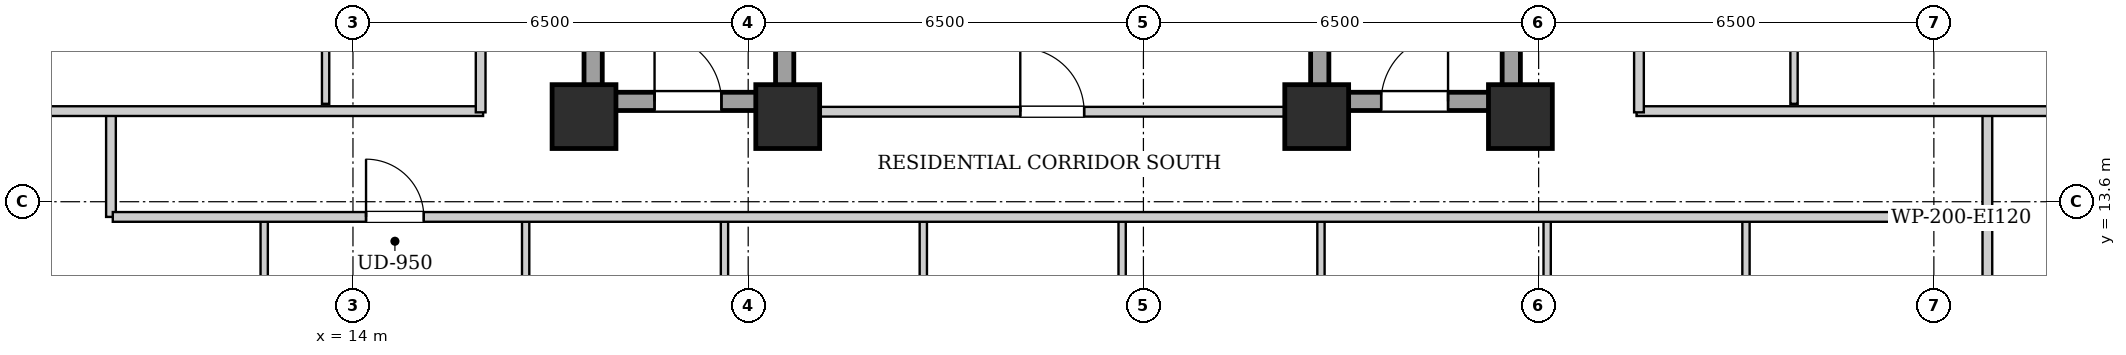
"""IFC4 building model, lengths in metres.
Left out: names, types, materials, properties, quantities, classifications, styles, units other than length and angle.
Written with IfcOpenShell. Run it as: python <this file> out.ifc"""

import sys

from ifc_helpers import new_model, si_unit, direction, frame, frame_2d, origin, origin_2d, place, context, subcontext, project, spatial, rectangle, extrude, element, fill, save


model = new_model("IFC4")
c1 = context("Model", 3, precision=1e-05, world=origin(), true_north=direction((0.0, 1.0)))
c2 = subcontext(c1, "Body", "Model", "MODEL_VIEW")
j1 = project(units=[si_unit("LENGTHUNIT", "METRE"), si_unit("PLANEANGLEUNIT", "RADIAN")], contexts=[c1])
p1 = place(None, origin())
s1 = spatial("IfcSite", under=j1, at=p1, CompositionType="ELEMENT")
p2 = place(p1, origin())
s2 = spatial("IfcBuilding", under=s1, at=p2, CompositionType="ELEMENT")
p3 = place(p2, frame((0.0, 0.0, 100.7)))
s3 = spatial("IfcBuildingStorey", under=s2, at=p3, CompositionType="ELEMENT", Elevation=100.7)
for number, where, z_axis, x_axis in (
    (1, (17.8, 15.0, 0.0), (0.0, 0.0, 1.0), (1.0, 0.0, 0.0)),
    (2, (21.15, 15.0, 0.0), (0.0, 0.0, 1.0), (1.0, 0.0, 0.0)),
    (3, (29.85, 15.0, 0.0), (0.0, 0.0, 1.0), (1.0, 0.0, 0.0)),
    (4, (33.2, 15.0, 0.0), (0.0, 0.0, 1.0), (1.0, 0.0, 0.0)),
):
    element("IfcColumn", number, at=place(p3, frame(where, z_axis=z_axis, x_axis=x_axis)), inside=s3, PredefinedType="COLUMN", context=c2, shape_type="SweptSolid", body=[
        extrude(rectangle(XDim=1.05, YDim=1.05, at=origin_2d()), origin(), (0.0, 0.0, 1.0), 3.2),
    ])
for number, where, z_axis, x_axis in (
    (5, (17.95, 15.1, 0.0), (0.0, 0.0, 1.0), (0.0, 1.0, 0.0)),
    (6, (21.1, 15.1, 0.0), (0.0, 0.0, 1.0), (0.0, 1.0, 0.0)),
):
    element("IfcWall", number, at=place(p3, frame(where, z_axis=z_axis, x_axis=x_axis)), inside=s3, PredefinedType="SHEAR", context=c2, shape_type="SweptSolid", body=[
        extrude(rectangle(XDim=9.0, YDim=0.3, at=frame_2d((4.5, 0.0))), origin(), (0.0, 0.0, 1.0), 2.94),
    ])
p4 = place(p3, frame((18.1, 15.25, 0.0), z_axis=(0.0, 0.0, 1.0), x_axis=(1.0, 0.0, 0.0)))
e7 = element("IfcWall", 7, at=p4, inside=s3, PredefinedType="SHEAR", context=c2, shape_type="SweptSolid", body=[
    extrude(rectangle(XDim=2.85, YDim=0.3, at=frame_2d((1.425, 0.0))), origin(), (0.0, 0.0, 1.0), 2.94),
])
p5 = place(p4, frame((0.86, 0.0, 0.0)))
e8 = element("IfcOpeningElement", 8, at=p5, cuts=e7, PredefinedType="OPENING", context=c2, shape_type="SweptSolid", body=[
    extrude(rectangle(XDim=1.1, YDim=2.05, at=frame_2d((0.55, 1.025))), frame((0.0, 0.16, 0.0), z_axis=(0.0, -1.0, 0.0), x_axis=(1.0, 0.0, 0.0)), (0.0, 0.0, 1.0), 0.32),
])
for number, where, z_axis, x_axis in (
    (9, (29.9, 15.1, 0.0), (0.0, 0.0, 1.0), (0.0, 1.0, 0.0)),
    (10, (33.05, 15.1, 0.0), (0.0, 0.0, 1.0), (0.0, 1.0, 0.0)),
):
    element("IfcWall", number, at=place(p3, frame(where, z_axis=z_axis, x_axis=x_axis)), inside=s3, PredefinedType="SHEAR", context=c2, shape_type="SweptSolid", body=[
        extrude(rectangle(XDim=9.0, YDim=0.3, at=frame_2d((4.5, 0.0))), origin(), (0.0, 0.0, 1.0), 2.94),
    ])
p6 = place(p3, frame((30.05, 15.25, 0.0), z_axis=(0.0, 0.0, 1.0), x_axis=(1.0, 0.0, 0.0)))
e11 = element("IfcWall", 11, at=p6, inside=s3, PredefinedType="SHEAR", context=c2, shape_type="SweptSolid", body=[
    extrude(rectangle(XDim=2.85, YDim=0.3, at=frame_2d((1.425, 0.0))), origin(), (0.0, 0.0, 1.0), 2.94),
])
p7 = place(p6, frame((0.86, 0.0, 0.0)))
e12 = element("IfcOpeningElement", 12, at=p7, cuts=e11, PredefinedType="OPENING", context=c2, shape_type="SweptSolid", body=[
    extrude(rectangle(XDim=1.1, YDim=2.05, at=frame_2d((0.55, 1.025))), frame((0.0, 0.16, 0.0), z_axis=(0.0, -1.0, 0.0), x_axis=(1.0, 0.0, 0.0)), (0.0, 0.0, 1.0), 0.32),
])
p8 = place(p3, frame((21.25, 15.08, 0.0), z_axis=(0.0, 0.0, 1.0), x_axis=(1.0, 0.0, 0.0)))
e13 = element("IfcWall", 13, at=p8, inside=s3, PredefinedType="PARTITIONING", context=c2, shape_type="SweptSolid", body=[
    extrude(rectangle(XDim=8.5, YDim=0.16, at=frame_2d((4.25, 0.0))), origin(), (0.0, 0.0, 1.0), 2.313),
])
p9 = place(p8, frame((3.725, 0.0, 0.0)))
e14 = element("IfcOpeningElement", 14, at=p9, cuts=e13, PredefinedType="OPENING", context=c2, shape_type="SweptSolid", body=[
    extrude(rectangle(XDim=1.05, YDim=2.05, at=frame_2d((0.525, 1.025))), frame((0.0, 0.09, 0.0), z_axis=(0.0, -1.0, 0.0), x_axis=(1.0, 0.0, 0.0)), (0.0, 0.0, 1.0), 0.18),
])
for number, where, z_axis, x_axis in (
    (15, (10.02, 13.35, 0.0), (0.0, 0.0, 1.0), (0.0, 1.0, 0.0)),
    (16, (40.88, 13.35, 0.0), (0.0, 0.0, 1.0), (0.0, 1.0, 0.0)),
):
    element("IfcWall", number, at=place(p3, frame(where, z_axis=z_axis, x_axis=x_axis)), inside=s3, PredefinedType="PARTITIONING", context=c2, shape_type="SweptSolid", body=[
        extrude(rectangle(XDim=1.74, YDim=0.16, at=frame_2d((0.87, 0.0))), origin(), (0.0, 0.0, 1.0), 2.94),
    ])
p10 = place(p3, frame((7.78, 15.09, 0.0), z_axis=(0.0, 0.0, 1.0), x_axis=(1.0, 0.0, 0.0)))
e17 = element("IfcWall", 17, at=p10, inside=s3, PredefinedType="PARTITIONING", context=c2, shape_type="SweptSolid", body=[
    extrude(rectangle(XDim=8.36, YDim=0.16, at=frame_2d((4.18, 0.0))), origin(), (0.0, 0.0, 1.0), 2.313),
])
p11 = place(p3, frame((35.11, 15.09, 0.0), z_axis=(0.0, 0.0, 1.0), x_axis=(1.0, 0.0, 0.0)))
e18 = element("IfcWall", 18, at=p11, inside=s3, PredefinedType="PARTITIONING", context=c2, shape_type="SweptSolid", body=[
    extrude(rectangle(XDim=8.01, YDim=0.16, at=frame_2d((4.005, 0.0))), origin(), (0.0, 0.0, 1.0), 2.313),
])
p12 = place(p3, frame((40.88, 10.4, 0.0), z_axis=(0.0, 0.0, 1.0), x_axis=(0.0, 1.0, 0.0)))
e19 = element("IfcWall", 19, at=p12, inside=s3, PredefinedType="PARTITIONING", context=c2, shape_type="SweptSolid", body=[
    extrude(rectangle(XDim=2.91, YDim=0.16, at=frame_2d((1.455, 0.0))), origin(), (0.0, 0.0, 1.0), 2.94),
])
p13 = place(p3, frame((12.54, 10.46, 0.0), z_axis=(0.0, 0.0, 1.0), x_axis=(0.0, 1.0, 0.0)))
e20 = element("IfcWall", 20, at=p13, inside=s3, PredefinedType="PARTITIONING", context=c2, shape_type="SweptSolid", body=[
    extrude(rectangle(XDim=2.85, YDim=0.12, at=frame_2d((1.425, 0.0))), origin(), (0.0, 0.0, 1.0), 2.94),
])
p14 = place(p13, frame((0.995, 0.0, 0.0)))
e21 = element("IfcOpeningElement", 21, at=p14, cuts=e20, PredefinedType="OPENING", context=c2, shape_type="SweptSolid", body=[
    extrude(rectangle(XDim=0.86, YDim=2.05, at=frame_2d((0.43, 1.025))), frame((0.0, 0.07, 0.0), z_axis=(0.0, -1.0, 0.0), x_axis=(1.0, 0.0, 0.0)), (0.0, 0.0, 1.0), 0.14),
])
p15 = place(p3, frame((16.84, 10.46, 0.0), z_axis=(0.0, 0.0, 1.0), x_axis=(0.0, 1.0, 0.0)))
e22 = element("IfcWall", 22, at=p15, inside=s3, PredefinedType="PARTITIONING", context=c2, shape_type="SweptSolid", body=[
    extrude(rectangle(XDim=2.85, YDim=0.12, at=frame_2d((1.425, 0.0))), origin(), (0.0, 0.0, 1.0), 2.94),
])
p16 = place(p15, frame((0.975, 0.0, 0.0)))
e23 = element("IfcOpeningElement", 23, at=p16, cuts=e22, PredefinedType="OPENING", context=c2, shape_type="SweptSolid", body=[
    extrude(rectangle(XDim=0.9, YDim=2.05, at=frame_2d((0.45, 1.025))), frame((0.0, 0.07, 0.0), z_axis=(0.0, -1.0, 0.0), x_axis=(1.0, 0.0, 0.0)), (0.0, 0.0, 1.0), 0.14),
])
p17 = place(p3, frame((20.11, 10.46, 0.0), z_axis=(0.0, 0.0, 1.0), x_axis=(0.0, 1.0, 0.0)))
e24 = element("IfcWall", 24, at=p17, inside=s3, PredefinedType="PARTITIONING", context=c2, shape_type="SweptSolid", body=[
    extrude(rectangle(XDim=2.85, YDim=0.12, at=frame_2d((1.425, 0.0))), origin(), (0.0, 0.0, 1.0), 2.94),
])
p18 = place(p17, frame((0.975, 0.0, 0.0)))
e25 = element("IfcOpeningElement", 25, at=p18, cuts=e24, PredefinedType="OPENING", context=c2, shape_type="SweptSolid", body=[
    extrude(rectangle(XDim=0.9, YDim=2.05, at=frame_2d((0.45, 1.025))), frame((0.0, 0.07, 0.0), z_axis=(0.0, -1.0, 0.0), x_axis=(1.0, 0.0, 0.0)), (0.0, 0.0, 1.0), 0.14),
])
p19 = place(p3, frame((23.38, 10.46, 0.0), z_axis=(0.0, 0.0, 1.0), x_axis=(0.0, 1.0, 0.0)))
e26 = element("IfcWall", 26, at=p19, inside=s3, PredefinedType="PARTITIONING", context=c2, shape_type="SweptSolid", body=[
    extrude(rectangle(XDim=2.85, YDim=0.12, at=frame_2d((1.425, 0.0))), origin(), (0.0, 0.0, 1.0), 2.94),
])
p20 = place(p19, frame((0.975, 0.0, 0.0)))
e27 = element("IfcOpeningElement", 27, at=p20, cuts=e26, PredefinedType="OPENING", context=c2, shape_type="SweptSolid", body=[
    extrude(rectangle(XDim=0.9, YDim=2.05, at=frame_2d((0.45, 1.025))), frame((0.0, 0.07, 0.0), z_axis=(0.0, -1.0, 0.0), x_axis=(1.0, 0.0, 0.0)), (0.0, 0.0, 1.0), 0.14),
])
p21 = place(p3, frame((26.65, 10.46, 0.0), z_axis=(0.0, 0.0, 1.0), x_axis=(0.0, 1.0, 0.0)))
e28 = element("IfcWall", 28, at=p21, inside=s3, PredefinedType="PARTITIONING", context=c2, shape_type="SweptSolid", body=[
    extrude(rectangle(XDim=2.85, YDim=0.12, at=frame_2d((1.425, 0.0))), origin(), (0.0, 0.0, 1.0), 2.94),
])
p22 = place(p21, frame((0.975, 0.0, 0.0)))
e29 = element("IfcOpeningElement", 29, at=p22, cuts=e28, PredefinedType="OPENING", context=c2, shape_type="SweptSolid", body=[
    extrude(rectangle(XDim=0.9, YDim=2.05, at=frame_2d((0.45, 1.025))), frame((0.0, 0.07, 0.0), z_axis=(0.0, -1.0, 0.0), x_axis=(1.0, 0.0, 0.0)), (0.0, 0.0, 1.0), 0.14),
])
p23 = place(p3, frame((29.92, 10.46, 0.0), z_axis=(0.0, 0.0, 1.0), x_axis=(0.0, 1.0, 0.0)))
e30 = element("IfcWall", 30, at=p23, inside=s3, PredefinedType="PARTITIONING", context=c2, shape_type="SweptSolid", body=[
    extrude(rectangle(XDim=2.85, YDim=0.12, at=frame_2d((1.425, 0.0))), origin(), (0.0, 0.0, 1.0), 2.94),
])
p24 = place(p23, frame((0.975, 0.0, 0.0)))
e31 = element("IfcOpeningElement", 31, at=p24, cuts=e30, PredefinedType="OPENING", context=c2, shape_type="SweptSolid", body=[
    extrude(rectangle(XDim=0.9, YDim=2.05, at=frame_2d((0.45, 1.025))), frame((0.0, 0.07, 0.0), z_axis=(0.0, -1.0, 0.0), x_axis=(1.0, 0.0, 0.0)), (0.0, 0.0, 1.0), 0.14),
])
p25 = place(p3, frame((33.64, 10.46, 0.0), z_axis=(0.0, 0.0, 1.0), x_axis=(0.0, 1.0, 0.0)))
e32 = element("IfcWall", 32, at=p25, inside=s3, PredefinedType="PARTITIONING", context=c2, shape_type="SweptSolid", body=[
    extrude(rectangle(XDim=2.85, YDim=0.12, at=frame_2d((1.425, 0.0))), origin(), (0.0, 0.0, 1.0), 2.94),
])
p26 = place(p25, frame((0.975, 0.0, 0.0)))
e33 = element("IfcOpeningElement", 33, at=p26, cuts=e32, PredefinedType="OPENING", context=c2, shape_type="SweptSolid", body=[
    extrude(rectangle(XDim=0.9, YDim=2.05, at=frame_2d((0.45, 1.025))), frame((0.0, 0.07, 0.0), z_axis=(0.0, -1.0, 0.0), x_axis=(1.0, 0.0, 0.0)), (0.0, 0.0, 1.0), 0.14),
])
p27 = place(p3, frame((36.91, 10.46, 0.0), z_axis=(0.0, 0.0, 1.0), x_axis=(0.0, 1.0, 0.0)))
e34 = element("IfcWall", 34, at=p27, inside=s3, PredefinedType="PARTITIONING", context=c2, shape_type="SweptSolid", body=[
    extrude(rectangle(XDim=2.85, YDim=0.12, at=frame_2d((1.425, 0.0))), origin(), (0.0, 0.0, 1.0), 2.94),
])
p28 = place(p27, frame((0.975, 0.0, 0.0)))
e35 = element("IfcOpeningElement", 35, at=p28, cuts=e34, PredefinedType="OPENING", context=c2, shape_type="SweptSolid", body=[
    extrude(rectangle(XDim=0.9, YDim=2.05, at=frame_2d((0.45, 1.025))), frame((0.0, 0.07, 0.0), z_axis=(0.0, -1.0, 0.0), x_axis=(1.0, 0.0, 0.0)), (0.0, 0.0, 1.0), 0.14),
])
p29 = place(p3, frame((13.55, 15.21, 0.0), z_axis=(0.0, 0.0, 1.0), x_axis=(0.0, 1.0, 0.0)))
e36 = element("IfcWall", 36, at=p29, inside=s3, PredefinedType="PARTITIONING", context=c2, shape_type="SweptSolid", body=[
    extrude(rectangle(XDim=2.159, YDim=0.12, at=frame_2d((1.08, 0.0))), origin(), (0.0, 0.0, 1.0), 2.94),
])
p30 = place(p3, frame((37.7, 15.21, 0.0), z_axis=(0.0, 0.0, 1.0), x_axis=(0.0, 1.0, 0.0)))
e37 = element("IfcWall", 37, at=p30, inside=s3, PredefinedType="PARTITIONING", context=c2, shape_type="SweptSolid", body=[
    extrude(rectangle(XDim=2.3, YDim=0.12, at=frame_2d((1.15, 0.0))), origin(), (0.0, 0.0, 1.0), 2.94),
])
p31 = place(p3, frame((10.05, 13.35, 0.0), z_axis=(0.0, 0.0, 1.0), x_axis=(1.0, 0.0, 0.0)))
e38 = element("IfcWall", 38, at=p31, inside=s3, PredefinedType="PARTITIONING", context=c2, shape_type="SweptSolid", body=[
    extrude(rectangle(XDim=30.8, YDim=0.16, at=frame_2d((15.4, 0.0))), origin(), (0.0, 0.0, 1.0), 2.94),
])
p32 = place(p31, frame((4.165, 0.0, 0.0)))
e39 = element("IfcOpeningElement", 39, at=p32, cuts=e38, PredefinedType="OPENING", context=c2, shape_type="SweptSolid", body=[
    extrude(rectangle(XDim=0.95, YDim=2.1, at=frame_2d((0.475, 1.05))), frame((0.0, 0.09, 0.0), z_axis=(0.0, -1.0, 0.0), x_axis=(1.0, 0.0, 0.0)), (0.0, 0.0, 1.0), 0.18),
])
p33 = place(p3, frame((16.1, 15.07, 0.0), z_axis=(0.0, 0.0, 1.0), x_axis=(0.0, 1.0, 0.0)))
e40 = element("IfcWall", 40, at=p33, inside=s3, PredefinedType="PARTITIONING", context=c2, shape_type="SweptSolid", body=[
    extrude(rectangle(XDim=13.93, YDim=0.16, at=frame_2d((6.965, 0.0))), origin(), (0.0, 0.0, 1.0), 2.94),
])
p34 = place(p33, frame((4.661, 0.0, 0.0)))
e41 = element("IfcOpeningElement", 41, at=p34, cuts=e40, PredefinedType="OPENING", context=c2, shape_type="SweptSolid", body=[
    extrude(rectangle(XDim=0.95, YDim=2.1, at=frame_2d((0.475, 1.05))), frame((0.0, 0.09, 0.0), z_axis=(0.0, -1.0, 0.0), x_axis=(1.0, 0.0, 0.0)), (0.0, 0.0, 1.0), 0.18),
])
p35 = place(p33, frame((11.411, 0.0, 0.0)))
e42 = element("IfcOpeningElement", 42, at=p35, cuts=e40, PredefinedType="OPENING", context=c2, shape_type="SweptSolid", body=[
    extrude(rectangle(XDim=0.95, YDim=2.1, at=frame_2d((0.475, 1.05))), frame((0.0, 0.09, 0.0), z_axis=(0.0, -1.0, 0.0), x_axis=(1.0, 0.0, 0.0)), (0.0, 0.0, 1.0), 0.18),
])
p36 = place(p3, frame((35.15, 15.07, 0.0), z_axis=(0.0, 0.0, 1.0), x_axis=(0.0, 1.0, 0.0)))
e43 = element("IfcWall", 43, at=p36, inside=s3, PredefinedType="PARTITIONING", context=c2, shape_type="SweptSolid", body=[
    extrude(rectangle(XDim=13.93, YDim=0.16, at=frame_2d((6.965, 0.0))), origin(), (0.0, 0.0, 1.0), 2.94),
])
p37 = place(p36, frame((4.385, 0.0, 0.0)))
e44 = element("IfcOpeningElement", 44, at=p37, cuts=e43, PredefinedType="OPENING", context=c2, shape_type="SweptSolid", body=[
    extrude(rectangle(XDim=0.95, YDim=2.1, at=frame_2d((0.475, 1.05))), frame((0.0, 0.09, 0.0), z_axis=(0.0, -1.0, 0.0), x_axis=(1.0, 0.0, 0.0)), (0.0, 0.0, 1.0), 0.18),
])
p38 = place(p5, origin())
e45 = element("IfcDoor", 45, at=p38, inside=s3, OperationType="SINGLE_SWING_LEFT", PredefinedType="DOOR", context=c2, shape_type="SweptSolid", body=[
    extrude(rectangle(XDim=1.1, YDim=2.05, at=frame_2d((0.55, 1.025))), frame((0.0, 0.025, 0.0), z_axis=(0.0, -1.0, 0.0), x_axis=(1.0, 0.0, 0.0)), (0.0, 0.0, 1.0), 0.05),
])
fill(e8, e45)
p39 = place(p7, origin())
e46 = element("IfcDoor", 46, at=p39, inside=s3, OperationType="SINGLE_SWING_RIGHT", PredefinedType="DOOR", context=c2, shape_type="SweptSolid", body=[
    extrude(rectangle(XDim=1.1, YDim=2.05, at=frame_2d((0.55, 1.025))), frame((0.0, 0.025, 0.0), z_axis=(0.0, -1.0, 0.0), x_axis=(1.0, 0.0, 0.0)), (0.0, 0.0, 1.0), 0.05),
])
fill(e12, e46)
p40 = place(p9, origin())
e47 = element("IfcDoor", 47, at=p40, inside=s3, OperationType="SINGLE_SWING_LEFT", PredefinedType="DOOR", context=c2, shape_type="SweptSolid", body=[
    extrude(rectangle(XDim=1.05, YDim=2.05, at=frame_2d((0.525, 1.025))), frame((0.0, 0.025, 0.0), z_axis=(0.0, -1.0, 0.0), x_axis=(1.0, 0.0, 0.0)), (0.0, 0.0, 1.0), 0.05),
])
fill(e14, e47)
p41 = place(p32, origin())
e48 = element("IfcDoor", 48, at=p41, inside=s3, OperationType="SINGLE_SWING_LEFT", PredefinedType="DOOR", context=c2, shape_type="SweptSolid", body=[
    extrude(rectangle(XDim=0.95, YDim=2.1, at=frame_2d((0.475, 1.05))), frame((0.0, 0.025, 0.0), z_axis=(0.0, -1.0, 0.0), x_axis=(1.0, 0.0, 0.0)), (0.0, 0.0, 1.0), 0.05),
])
fill(e39, e48)
save(model, sys.argv[1])
